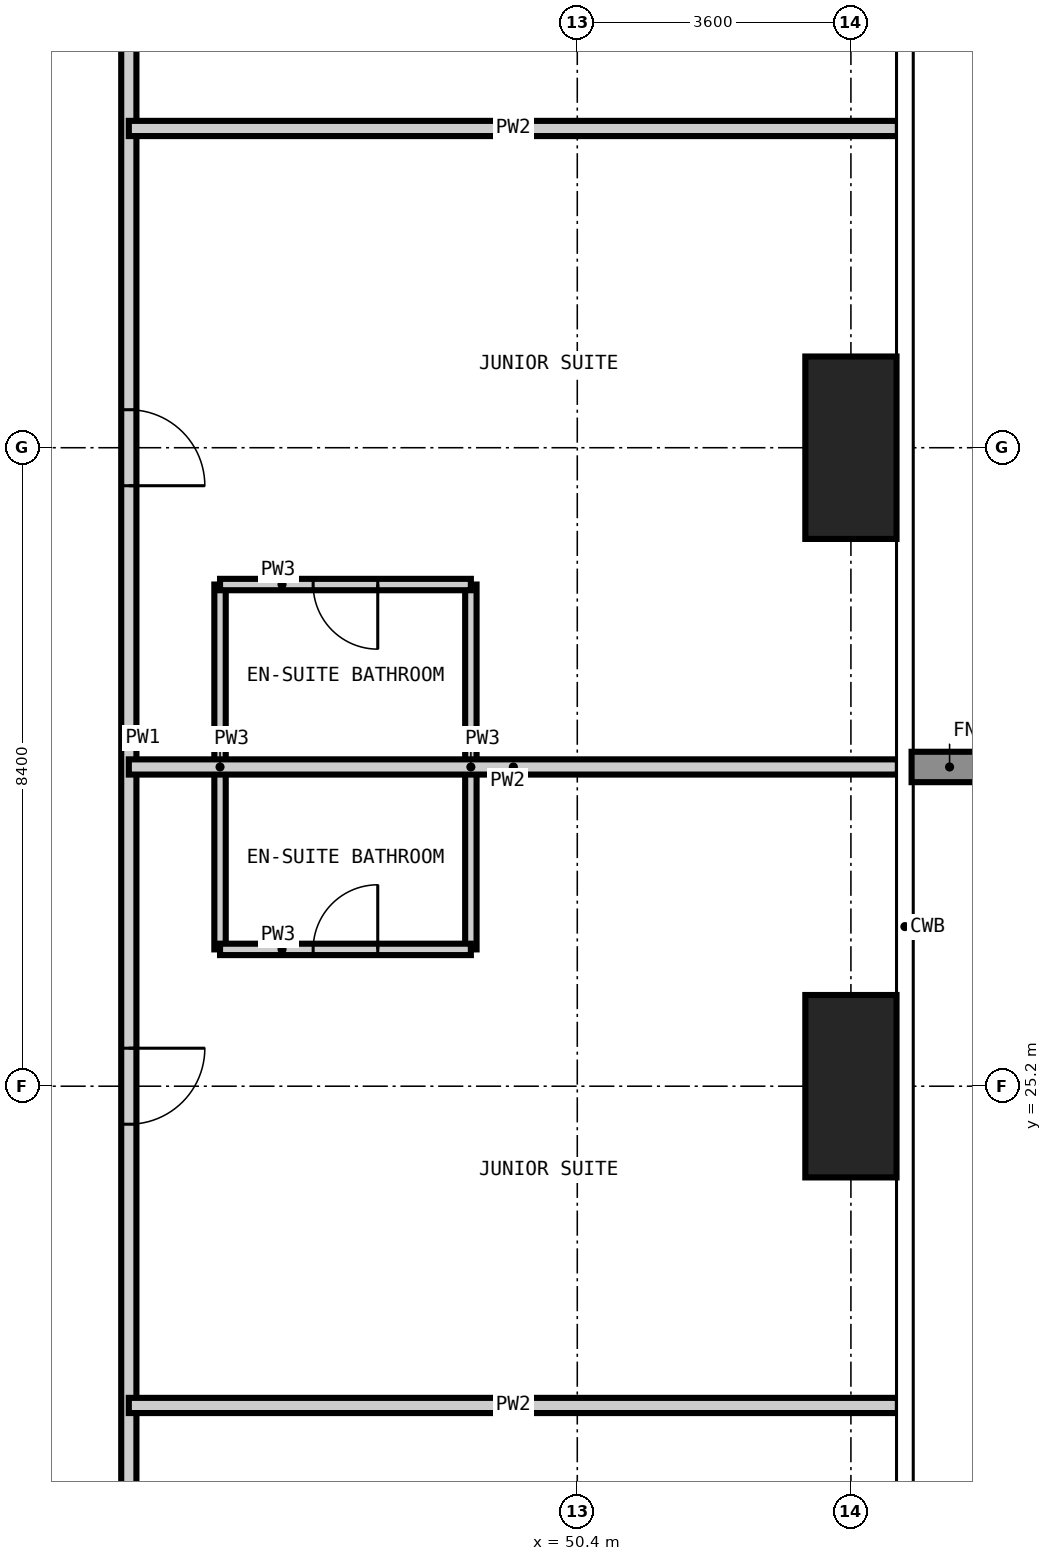
"""IFC4 building model, lengths in metres.
Left out: names, types, materials, properties, quantities, classifications, styles, units other than length and angle.
Written with IfcOpenShell. Run it as: python <this file> out.ifc"""

import sys

from ifc_helpers import new_model, si_unit, direction, frame, frame_2d, origin, origin_2d, place, context, subcontext, project, spatial, rectangle, extrude, element, fill, save


model = new_model("IFC4")
c1 = context("Model", 3, precision=1e-05, world=origin(), true_north=direction((0.0, 1.0)))
c2 = subcontext(c1, "Body", "Model", "MODEL_VIEW")
j1 = project(units=[si_unit("LENGTHUNIT", "METRE"), si_unit("PLANEANGLEUNIT", "RADIAN")], contexts=[c1])
p1 = place(None, origin())
s1 = spatial("IfcSite", under=j1, at=p1, CompositionType="ELEMENT")
p2 = place(p1, origin())
s2 = spatial("IfcBuilding", under=s1, at=p2, CompositionType="ELEMENT")
p3 = place(p2, frame((0.0, 0.0, 97.2)))
s3 = spatial("IfcBuildingStorey", under=s2, at=p3, CompositionType="ELEMENT", Elevation=97.2)
for number, where, z_axis, x_axis in (
    (1, (54.0, 25.2, -0.35), (0.0, 0.0, 1.0), (1.0, 0.0, 0.0)),
    (2, (54.0, 33.6, -0.35), (0.0, 0.0, 1.0), (1.0, 0.0, 0.0)),
):
    element("IfcColumn", number, at=place(p3, frame(where, z_axis=z_axis, x_axis=x_axis)), inside=s3, PredefinedType="COLUMN", context=c2, shape_type="SweptSolid", body=[
        extrude(rectangle(XDim=1.2, YDim=2.4, at=origin_2d()), origin(), (0.0, 0.0, 1.0), 3.6),
    ])
for number, where, z_axis, x_axis in (
    (3, (45.7, 27.0, 0.0), (0.0, 0.0, 1.0), (0.0, 1.0, 0.0)),
    (4, (49.0, 27.0, 0.0), (0.0, 0.0, 1.0), (0.0, 1.0, 0.0)),
):
    element("IfcWall", number, at=place(p3, frame(where, z_axis=z_axis, x_axis=x_axis)), inside=s3, PredefinedType="PARTITIONING", context=c2, shape_type="SweptSolid", body=[
        extrude(rectangle(XDim=4.8, YDim=0.15, at=frame_2d((2.4, 0.0))), origin(), (0.0, 0.0, 1.0), 3.25),
    ])
p4 = place(p3, frame((45.7, 27.0, 0.0), z_axis=(0.0, 0.0, 1.0), x_axis=(1.0, 0.0, 0.0)))
e5 = element("IfcWall", 5, at=p4, inside=s3, PredefinedType="PARTITIONING", context=c2, shape_type="SweptSolid", body=[
    extrude(rectangle(XDim=3.3, YDim=0.15, at=frame_2d((1.65, 0.0))), origin(), (0.0, 0.0, 1.0), 3.25),
])
p5 = place(p4, frame((1.225, 0.0, 0.0)))
e6 = element("IfcOpeningElement", 6, at=p5, cuts=e5, PredefinedType="OPENING", context=c2, shape_type="SweptSolid", body=[
    extrude(rectangle(XDim=0.85, YDim=2.1, at=frame_2d((0.425, 1.05))), frame((0.0, 0.085, 0.0), z_axis=(0.0, -1.0, 0.0), x_axis=(1.0, 0.0, 0.0)), (0.0, 0.0, 1.0), 0.17),
])
p6 = place(p3, frame((45.7, 31.8, 0.0), z_axis=(0.0, 0.0, 1.0), x_axis=(1.0, 0.0, 0.0)))
e7 = element("IfcWall", 7, at=p6, inside=s3, PredefinedType="PARTITIONING", context=c2, shape_type="SweptSolid", body=[
    extrude(rectangle(XDim=3.3, YDim=0.15, at=frame_2d((1.65, 0.0))), origin(), (0.0, 0.0, 1.0), 3.25),
])
p7 = place(p6, frame((1.225, 0.0, 0.0)))
e8 = element("IfcOpeningElement", 8, at=p7, cuts=e7, PredefinedType="OPENING", context=c2, shape_type="SweptSolid", body=[
    extrude(rectangle(XDim=0.85, YDim=2.1, at=frame_2d((0.425, 1.05))), frame((0.0, 0.085, 0.0), z_axis=(0.0, -1.0, 0.0), x_axis=(1.0, 0.0, 0.0)), (0.0, 0.0, 1.0), 0.17),
])
p8 = place(p3, frame((44.5, 45.7, 0.0), z_axis=(0.0, 0.0, 1.0), x_axis=(0.0, -1.0, 0.0)))
e9 = element("IfcWall", 9, at=p8, inside=s3, PredefinedType="PARTITIONING", context=c2, shape_type="SweptSolid", body=[
    extrude(rectangle(XDim=32.0, YDim=0.2, at=frame_2d((16.0, 0.0))), origin(), (0.0, 0.0, 1.0), 3.25),
])
p9 = place(p8, frame((26.3, 0.0, 0.0)))
e10 = element("IfcOpeningElement", 10, at=p9, cuts=e9, PredefinedType="OPENING", context=c2, shape_type="SweptSolid", body=[
    extrude(rectangle(XDim=1.0, YDim=2.2, at=frame_2d((0.5, 1.1))), frame((0.0, 0.11, 0.0), z_axis=(0.0, -1.0, 0.0), x_axis=(1.0, 0.0, 0.0)), (0.0, 0.0, 1.0), 0.22),
])
p10 = place(p8, frame((20.0, 0.0, 0.0)))
e11 = element("IfcOpeningElement", 11, at=p10, cuts=e9, PredefinedType="OPENING", context=c2, shape_type="SweptSolid", body=[
    extrude(rectangle(XDim=1.0, YDim=2.2, at=frame_2d((0.5, 1.1))), frame((0.0, 0.11, 0.0), z_axis=(0.0, -1.0, 0.0), x_axis=(1.0, 0.0, 0.0)), (0.0, 0.0, 1.0), 0.22),
])
p11 = place(p8, frame((11.6, 0.0, 0.0)))
e12 = element("IfcOpeningElement", 12, at=p11, cuts=e9, PredefinedType="OPENING", context=c2, shape_type="SweptSolid", body=[
    extrude(rectangle(XDim=1.0, YDim=2.2, at=frame_2d((0.5, 1.1))), frame((0.0, 0.11, 0.0), z_axis=(0.0, -1.0, 0.0), x_axis=(1.0, 0.0, 0.0)), (0.0, 0.0, 1.0), 0.22),
])
p12 = place(p8, frame((5.3, 0.0, 0.0)))
e13 = element("IfcOpeningElement", 13, at=p12, cuts=e9, PredefinedType="OPENING", context=c2, shape_type="SweptSolid", body=[
    extrude(rectangle(XDim=1.0, YDim=2.2, at=frame_2d((0.5, 1.1))), frame((0.0, 0.11, 0.0), z_axis=(0.0, -1.0, 0.0), x_axis=(1.0, 0.0, 0.0)), (0.0, 0.0, 1.0), 0.22),
])
p13 = place(p8, frame((29.95, 0.0, 0.0)))
e14 = element("IfcOpeningElement", 14, at=p13, cuts=e9, PredefinedType="OPENING", context=c2, shape_type="SweptSolid", body=[
    extrude(rectangle(XDim=1.0, YDim=2.2, at=frame_2d((0.5, 1.1))), frame((0.0, 0.11, 0.0), z_axis=(0.0, -1.0, 0.0), x_axis=(1.0, 0.0, 0.0)), (0.0, 0.0, 1.0), 0.22),
])
p14 = place(p8, frame((1.35, 0.0, 0.0)))
e15 = element("IfcOpeningElement", 15, at=p14, cuts=e9, PredefinedType="OPENING", context=c2, shape_type="SweptSolid", body=[
    extrude(rectangle(XDim=1.0, YDim=2.2, at=frame_2d((0.5, 1.1))), frame((0.0, 0.11, 0.0), z_axis=(0.0, -1.0, 0.0), x_axis=(1.0, 0.0, 0.0)), (0.0, 0.0, 1.0), 0.22),
])
for number, where, z_axis, x_axis in (
    (16, (44.5, 21.0, 0.0), (0.0, 0.0, 1.0), (1.0, 0.0, 0.0)),
    (17, (44.5, 29.4, 0.0), (0.0, 0.0, 1.0), (1.0, 0.0, 0.0)),
    (18, (44.5, 37.8, 0.0), (0.0, 0.0, 1.0), (1.0, 0.0, 0.0)),
):
    element("IfcWall", number, at=place(p3, frame(where, z_axis=z_axis, x_axis=x_axis)), inside=s3, PredefinedType="PARTITIONING", context=c2, shape_type="SweptSolid", body=[
        extrude(rectangle(XDim=10.118, YDim=0.2, at=frame_2d((5.059, 0.0))), origin(), (0.0, 0.0, 1.0), 3.25),
    ])
p15 = place(p10, origin())
e19 = element("IfcDoor", 19, at=p15, inside=s3, OperationType="SINGLE_SWING_LEFT", PredefinedType="DOOR", context=c2, shape_type="SweptSolid", body=[
    extrude(rectangle(XDim=1.0, YDim=2.2, at=frame_2d((0.5, 1.1))), frame((0.0, 0.025, 0.0), z_axis=(0.0, -1.0, 0.0), x_axis=(1.0, 0.0, 0.0)), (0.0, 0.0, 1.0), 0.05),
])
fill(e11, e19)
p16 = place(p5, origin())
e20 = element("IfcDoor", 20, at=p16, inside=s3, OperationType="SINGLE_SWING_RIGHT", PredefinedType="DOOR", context=c2, shape_type="SweptSolid", body=[
    extrude(rectangle(XDim=0.85, YDim=2.1, at=frame_2d((0.425, 1.05))), frame((0.0, 0.025, 0.0), z_axis=(0.0, -1.0, 0.0), x_axis=(1.0, 0.0, 0.0)), (0.0, 0.0, 1.0), 0.05),
])
fill(e6, e20)
p17 = place(p11, origin())
e21 = element("IfcDoor", 21, at=p17, inside=s3, OperationType="SINGLE_SWING_RIGHT", PredefinedType="DOOR", context=c2, shape_type="SweptSolid", body=[
    extrude(rectangle(XDim=1.0, YDim=2.2, at=frame_2d((0.5, 1.1))), frame((0.0, 0.025, 0.0), z_axis=(0.0, -1.0, 0.0), x_axis=(1.0, 0.0, 0.0)), (0.0, 0.0, 1.0), 0.05),
])
fill(e12, e21)
p18 = place(p7, frame((0.85, 0.0, 0.0), z_axis=(0.0, 0.0, 1.0), x_axis=(-1.0, 0.0, 0.0)))
e22 = element("IfcDoor", 22, at=p18, inside=s3, OperationType="SINGLE_SWING_LEFT", PredefinedType="DOOR", context=c2, shape_type="SweptSolid", body=[
    extrude(rectangle(XDim=0.85, YDim=2.1, at=frame_2d((0.425, 1.05))), frame((0.0, 0.025, 0.0), z_axis=(0.0, -1.0, 0.0), x_axis=(1.0, 0.0, 0.0)), (0.0, 0.0, 1.0), 0.05),
])
fill(e8, e22)
save(model, sys.argv[1])
